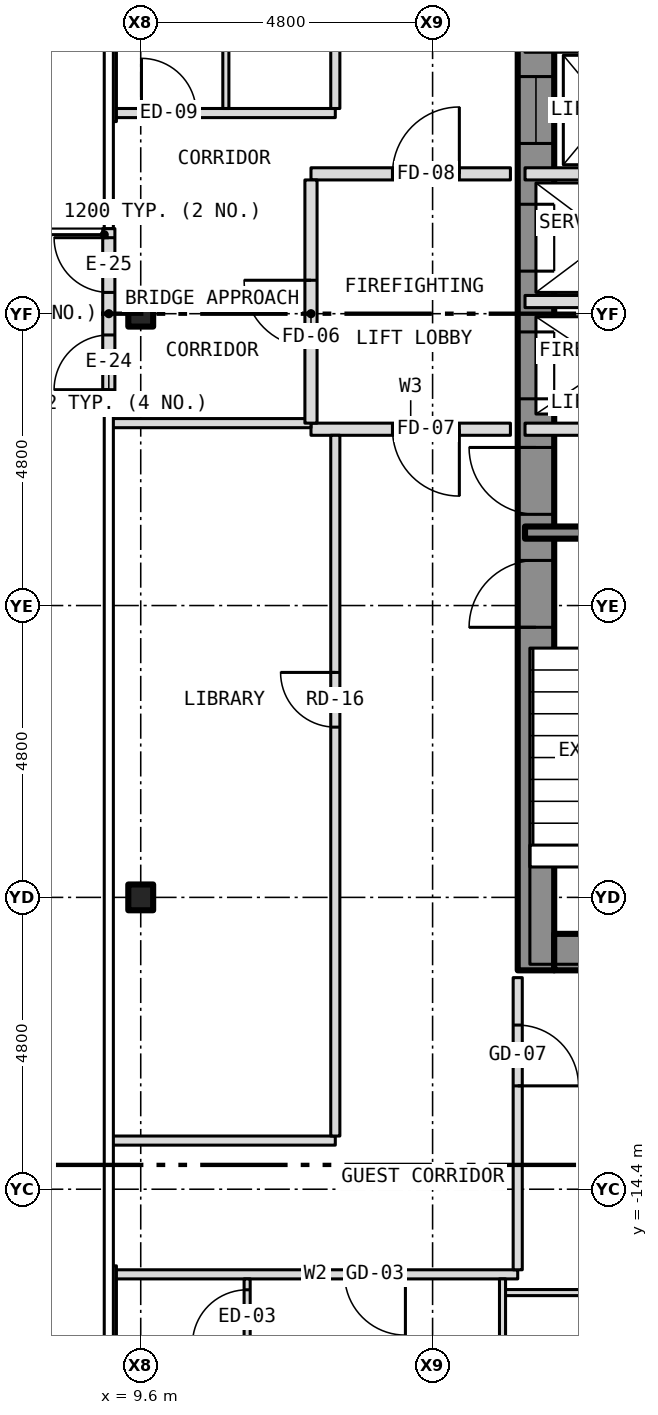
"""IFC4 building model, lengths in metres.
Left out: names, types, materials, properties, quantities, classifications, styles, units other than length and angle.
Written with IfcOpenShell. Run it as: python <this file> out.ifc"""

import sys

from ifc_helpers import new_model, si_unit, direction, frame, frame_2d, origin, origin_2d, place, context, subcontext, project, spatial, rectangle, i_section, extrude, element, fill, save


model = new_model("IFC4")
c1 = context("Model", 3, precision=1e-05, world=origin(), true_north=direction((0.0, 1.0)))
c2 = subcontext(c1, "Body", "Model", "MODEL_VIEW")
j1 = project(units=[si_unit("LENGTHUNIT", "METRE"), si_unit("PLANEANGLEUNIT", "RADIAN")], contexts=[c1])
p1 = place(None, origin())
s1 = spatial("IfcSite", under=j1, at=p1, CompositionType="ELEMENT")
p2 = place(p1, origin())
s2 = spatial("IfcBuilding", under=s1, at=p2, CompositionType="ELEMENT")
p3 = place(p2, frame((0.0, 0.0, 67.0)))
s3 = spatial("IfcBuildingStorey", under=s2, at=p3, CompositionType="ELEMENT", Elevation=67.0)
for number, where, z_axis, x_axis in (
    (1, (9.6, -9.6, -0.15), (0.0, 0.0, 1.0), (1.0, 0.0, 0.0)),
    (2, (9.6, 0.0, -0.15), (0.0, 0.0, 1.0), (1.0, 0.0, 0.0)),
):
    element("IfcColumn", number, at=place(p3, frame(where, z_axis=z_axis, x_axis=x_axis)), inside=s3, PredefinedType="COLUMN", context=c2, shape_type="SweptSolid", body=[
        extrude(i_section(OverallWidth=0.409, OverallDepth=0.424, WebThickness=0.033, FlangeThickness=0.052, at=origin_2d()), origin(), (0.0, 0.0, 1.0), 3.5),
    ])
p4 = place(p3, frame((16.1, -10.8, 0.0), z_axis=(0.0, 0.0, 1.0), x_axis=(0.0, 1.0, 0.0)))
e3 = element("IfcWall", 3, at=p4, inside=s3, PredefinedType="SHEAR", context=c2, shape_type="SweptSolid", body=[
    extrude(rectangle(XDim=21.6, YDim=0.6, at=frame_2d((10.8, 0.0))), origin(), (0.0, 0.0, 1.0), 3.25),
])
p5 = place(p4, frame((9.4, 0.0, 0.0)))
e4 = element("IfcOpeningElement", 4, at=p5, cuts=e3, PredefinedType="OPENING", context=c2, shape_type="SweptSolid", body=[
    extrude(rectangle(XDim=1.1, YDim=2.1, at=frame_2d((0.55, 1.05))), frame((0.0, 0.312, 0.0), z_axis=(0.0, -1.0, 0.0), x_axis=(1.0, 0.0, 0.0)), (0.0, 0.0, 1.0), 0.624),
])
p6 = place(p4, frame((11.5, 0.0, 0.0)))
e5 = element("IfcOpeningElement", 5, at=p6, cuts=e3, PredefinedType="OPENING", context=c2, shape_type="SweptSolid", body=[
    extrude(rectangle(XDim=1.1, YDim=2.1, at=frame_2d((0.55, 1.05))), frame((0.0, 0.312, 0.0), z_axis=(0.0, -1.0, 0.0), x_axis=(1.0, 0.0, 0.0)), (0.0, 0.0, 1.0), 0.624),
])
p7 = place(p4, frame((13.6, 0.0, 0.0)))
e6 = element("IfcOpeningElement", 6, at=p7, cuts=e3, PredefinedType="OPENING", context=c2, shape_type="SweptSolid", body=[
    extrude(rectangle(XDim=1.1, YDim=2.1, at=frame_2d((0.55, 1.05))), frame((0.0, 0.312, 0.0), z_axis=(0.0, -1.0, 0.0), x_axis=(1.0, 0.0, 0.0)), (0.0, 0.0, 1.0), 0.624),
])
p8 = place(p4, frame((15.7, 0.0, 0.0)))
e7 = element("IfcOpeningElement", 7, at=p8, cuts=e3, PredefinedType="OPENING", context=c2, shape_type="SweptSolid", body=[
    extrude(rectangle(XDim=1.1, YDim=2.1, at=frame_2d((0.55, 1.05))), frame((0.0, 0.312, 0.0), z_axis=(0.0, -1.0, 0.0), x_axis=(1.0, 0.0, 0.0)), (0.0, 0.0, 1.0), 0.624),
])
p9 = place(p4, frame((17.8, 0.0, 0.0)))
e8 = element("IfcOpeningElement", 8, at=p9, cuts=e3, PredefinedType="OPENING", context=c2, shape_type="SweptSolid", body=[
    extrude(rectangle(XDim=1.1, YDim=2.1, at=frame_2d((0.55, 1.05))), frame((0.0, 0.312, 0.0), z_axis=(0.0, -1.0, 0.0), x_axis=(1.0, 0.0, 0.0)), (0.0, 0.0, 1.0), 0.624),
])
p10 = place(p4, frame((5.642, 0.0, 0.0)))
e9 = element("IfcOpeningElement", 9, at=p10, cuts=e3, PredefinedType="OPENING", context=c2, shape_type="SweptSolid", body=[
    extrude(rectangle(XDim=1.1, YDim=2.1, at=frame_2d((0.55, 1.05))), frame((0.0, 0.312, 0.0), z_axis=(0.0, -1.0, 0.0), x_axis=(1.0, 0.0, 0.0)), (0.0, 0.0, 1.0), 0.624),
])
p11 = place(p4, frame((7.5, 0.0, 0.0)))
e10 = element("IfcOpeningElement", 10, at=p11, cuts=e3, PredefinedType="OPENING", context=c2, shape_type="SweptSolid", body=[
    extrude(rectangle(XDim=1.1, YDim=2.1, at=frame_2d((0.55, 1.05))), frame((0.0, 0.312, 0.0), z_axis=(0.0, -1.0, 0.0), x_axis=(1.0, 0.0, 0.0)), (0.0, 0.0, 1.0), 0.624),
])
p12 = place(p3, frame((16.4, -10.5, 0.0), z_axis=(0.0, 0.0, 1.0), x_axis=(1.0, 0.0, 0.0)))
e11 = element("IfcWall", 11, at=p12, inside=s3, PredefinedType="SHEAR", context=c2, shape_type="SweptSolid", body=[
    extrude(rectangle(XDim=7.0, YDim=0.6, at=frame_2d((3.5, 0.0))), origin(), (0.0, 0.0, 1.0), 3.25),
])
p13 = place(p3, frame((9.075, -1.4, 0.0), z_axis=(0.0, 0.0, 1.0), x_axis=(0.0, 1.0, 0.0)))
e12 = element("IfcWall", 12, at=p13, inside=s3, PredefinedType="SOLIDWALL", context=c2, shape_type="SweptSolid", body=[
    extrude(rectangle(XDim=2.8, YDim=0.2, at=frame_2d((1.4, 0.0))), origin(), (0.0, 0.0, 1.0), 3.5),
])
p14 = place(p13, frame((0.15, 0.0, 0.0)))
e13 = element("IfcOpeningElement", 13, at=p14, cuts=e12, PredefinedType="OPENING", context=c2, shape_type="SweptSolid", body=[
    extrude(rectangle(XDim=0.9, YDim=2.1, at=frame_2d((0.45, 1.05))), frame((0.0, 0.112, 0.0), z_axis=(0.0, -1.0, 0.0), x_axis=(1.0, 0.0, 0.0)), (0.0, 0.0, 1.0), 0.224),
])
p15 = place(p13, frame((1.75, 0.0, 0.0)))
e14 = element("IfcOpeningElement", 14, at=p15, cuts=e12, PredefinedType="OPENING", context=c2, shape_type="SweptSolid", body=[
    extrude(rectangle(XDim=0.9, YDim=2.1, at=frame_2d((0.45, 1.05))), frame((0.0, 0.112, 0.0), z_axis=(0.0, -1.0, 0.0), x_axis=(1.0, 0.0, 0.0)), (0.0, 0.0, 1.0), 0.224),
])
p16 = place(p3, frame((15.55, -16.1, 0.0), z_axis=(0.0, 0.0, 1.0), x_axis=(1.0, 0.0, 0.0)))
e15 = element("IfcWall", 15, at=p16, inside=s3, PredefinedType="PARTITIONING", context=c2, shape_type="SweptSolid", body=[
    extrude(rectangle(XDim=8.33, YDim=0.1, at=frame_2d((4.165, 0.0))), origin(), (0.0, 0.0, 1.0), 3.35),
])
p17 = place(p16, frame((3.778, 0.0, 0.0)))
e16 = element("IfcOpeningElement", 16, at=p17, cuts=e15, PredefinedType="OPENING", context=c2, shape_type="SweptSolid", body=[
    extrude(rectangle(XDim=0.9, YDim=2.1, at=frame_2d((0.45, 1.05))), frame((0.0, 0.062, 0.0), z_axis=(0.0, -1.0, 0.0), x_axis=(1.0, 0.0, 0.0)), (0.0, 0.0, 1.0), 0.124),
])
p18 = place(p3, frame((9.15, -15.8, 0.0), z_axis=(0.0, 0.0, 1.0), x_axis=(1.0, 0.0, 0.0)))
e17 = element("IfcWall", 17, at=p18, inside=s3, PredefinedType="PARTITIONING", context=c2, shape_type="SweptSolid", body=[
    extrude(rectangle(XDim=6.65, YDim=0.15, at=frame_2d((3.325, 0.0))), origin(), (0.0, 0.0, 1.0), 3.35),
])
p19 = place(p18, frame((3.803, 0.0, 0.0)))
e18 = element("IfcOpeningElement", 18, at=p19, cuts=e17, PredefinedType="OPENING", context=c2, shape_type="SweptSolid", body=[
    extrude(rectangle(XDim=1.0, YDim=2.1, at=frame_2d((0.5, 1.05))), frame((0.0, 0.087, 0.0), z_axis=(0.0, -1.0, 0.0), x_axis=(1.0, 0.0, 0.0)), (0.0, 0.0, 1.0), 0.174),
])
p20 = place(p3, frame((9.12, -13.6, 0.0), z_axis=(0.0, 0.0, 1.0), x_axis=(1.0, 0.0, 0.0)))
e19 = element("IfcWall", 19, at=p20, inside=s3, PredefinedType="PARTITIONING", context=c2, shape_type="SweptSolid", body=[
    extrude(rectangle(XDim=3.68, YDim=0.15, at=frame_2d((1.84, 0.0))), origin(), (0.0, 0.0, 1.0), 3.35),
])
p21 = place(p3, frame((15.92, -3.6, 0.0), z_axis=(0.0, 0.0, 1.0), x_axis=(1.0, 0.0, 0.0)))
e20 = element("IfcWall", 20, at=p21, inside=s3, PredefinedType="SHEAR", context=c2, shape_type="SweptSolid", body=[
    extrude(rectangle(XDim=4.08, YDim=0.2, at=frame_2d((2.04, 0.0))), origin(), (0.0, 0.0, 1.0), 3.25),
])
p22 = place(p3, frame((12.4, -1.9, 0.0), z_axis=(0.0, 0.0, 1.0), x_axis=(1.0, 0.0, 0.0)))
e21 = element("IfcWall", 21, at=p22, inside=s3, PredefinedType="PARTITIONING", context=c2, shape_type="SweptSolid", body=[
    extrude(rectangle(XDim=3.28, YDim=0.2, at=frame_2d((1.64, 0.0))), origin(), (0.0, 0.0, 1.0), 3.35),
])
p23 = place(p22, frame((1.34, 0.0, 0.0)))
e22 = element("IfcOpeningElement", 22, at=p23, cuts=e21, PredefinedType="OPENING", context=c2, shape_type="SweptSolid", body=[
    extrude(rectangle(XDim=1.1, YDim=2.1, at=frame_2d((0.55, 1.05))), frame((0.0, 0.112, 0.0), z_axis=(0.0, -1.0, 0.0), x_axis=(1.0, 0.0, 0.0)), (0.0, 0.0, 1.0), 0.224),
])
p24 = place(p3, frame((15.92, -1.9, 0.0), z_axis=(0.0, 0.0, 1.0), x_axis=(1.0, 0.0, 0.0)))
e23 = element("IfcWall", 23, at=p24, inside=s3, PredefinedType="PARTITIONING", context=c2, shape_type="SweptSolid", body=[
    extrude(rectangle(XDim=7.96, YDim=0.2, at=frame_2d((3.98, 0.0))), origin(), (0.0, 0.0, 1.0), 3.25),
])
p25 = place(p24, frame((3.74, 0.0, 0.0)))
e24 = element("IfcOpeningElement", 24, at=p25, cuts=e23, PredefinedType="OPENING", context=c2, shape_type="SweptSolid", body=[
    extrude(rectangle(XDim=0.9, YDim=2.1, at=frame_2d((0.45, 1.05))), frame((0.0, 0.112, 0.0), z_axis=(0.0, -1.0, 0.0), x_axis=(1.0, 0.0, 0.0)), (0.0, 0.0, 1.0), 0.224),
])
p26 = place(p3, frame((9.12, -1.8, 0.0), z_axis=(0.0, 0.0, 1.0), x_axis=(1.0, 0.0, 0.0)))
e25 = element("IfcWall", 25, at=p26, inside=s3, PredefinedType="PARTITIONING", context=c2, shape_type="SweptSolid", body=[
    extrude(rectangle(XDim=3.28, YDim=0.15, at=frame_2d((1.64, 0.0))), origin(), (0.0, 0.0, 1.0), 3.35),
])
p27 = place(p3, frame((15.92, 0.2, 0.0), z_axis=(0.0, 0.0, 1.0), x_axis=(1.0, 0.0, 0.0)))
e26 = element("IfcWall", 26, at=p27, inside=s3, PredefinedType="PARTITIONING", context=c2, shape_type="SweptSolid", body=[
    extrude(rectangle(XDim=2.88, YDim=0.2, at=frame_2d((1.44, 0.0))), origin(), (0.0, 0.0, 1.0), 3.25),
])
p28 = place(p3, frame((12.4, 2.3, 0.0), z_axis=(0.0, 0.0, 1.0), x_axis=(1.0, 0.0, 0.0)))
e27 = element("IfcWall", 27, at=p28, inside=s3, PredefinedType="PARTITIONING", context=c2, shape_type="SweptSolid", body=[
    extrude(rectangle(XDim=3.28, YDim=0.2, at=frame_2d((1.64, 0.0))), origin(), (0.0, 0.0, 1.0), 3.35),
])
p29 = place(p28, frame((1.34, 0.0, 0.0)))
e28 = element("IfcOpeningElement", 28, at=p29, cuts=e27, PredefinedType="OPENING", context=c2, shape_type="SweptSolid", body=[
    extrude(rectangle(XDim=1.1, YDim=2.1, at=frame_2d((0.55, 1.05))), frame((0.0, 0.112, 0.0), z_axis=(0.0, -1.0, 0.0), x_axis=(1.0, 0.0, 0.0)), (0.0, 0.0, 1.0), 0.224),
])
p30 = place(p3, frame((15.92, 2.3, 0.0), z_axis=(0.0, 0.0, 1.0), x_axis=(1.0, 0.0, 0.0)))
e29 = element("IfcWall", 29, at=p30, inside=s3, PredefinedType="PARTITIONING", context=c2, shape_type="SweptSolid", body=[
    extrude(rectangle(XDim=2.88, YDim=0.2, at=frame_2d((1.44, 0.0))), origin(), (0.0, 0.0, 1.0), 3.25),
])
p31 = place(p3, frame((9.15, 3.3, 0.0), z_axis=(0.0, 0.0, 1.0), x_axis=(1.0, 0.0, 0.0)))
e30 = element("IfcWall", 30, at=p31, inside=s3, PredefinedType="PARTITIONING", context=c2, shape_type="SweptSolid", body=[
    extrude(rectangle(XDim=3.65, YDim=0.15, at=frame_2d((1.825, 0.0))), origin(), (0.0, 0.0, 1.0), 3.35),
])
p32 = place(p31, frame((0.462, 0.0, 0.0)))
e31 = element("IfcOpeningElement", 31, at=p32, cuts=e30, PredefinedType="OPENING", context=c2, shape_type="SweptSolid", body=[
    extrude(rectangle(XDim=0.9, YDim=2.1, at=frame_2d((0.45, 1.05))), frame((0.0, 0.087, 0.0), z_axis=(0.0, -1.0, 0.0), x_axis=(1.0, 0.0, 0.0)), (0.0, 0.0, 1.0), 0.174),
])
p33 = place(p3, frame((15.92, 4.4, 0.0), z_axis=(0.0, 0.0, 1.0), x_axis=(1.0, 0.0, 0.0)))
e32 = element("IfcWall", 32, at=p33, inside=s3, PredefinedType="PARTITIONING", context=c2, shape_type="SweptSolid", body=[
    extrude(rectangle(XDim=2.88, YDim=0.2, at=frame_2d((1.44, 0.0))), origin(), (0.0, 0.0, 1.0), 3.25),
])
p34 = place(p3, frame((9.15, -19.14, 0.0), z_axis=(0.0, 0.0, 1.0), x_axis=(0.0, 1.0, 0.0)))
e33 = element("IfcWall", 33, at=p34, inside=s3, PredefinedType="PARTITIONING", context=c2, shape_type="SweptSolid", body=[
    extrude(rectangle(XDim=3.48, YDim=0.1, at=frame_2d((1.74, 0.0))), origin(), (0.0, 0.0, 1.0), 2.733),
])
p35 = place(p3, frame((9.15, 3.16, 0.0), z_axis=(0.0, 0.0, 1.0), x_axis=(0.0, 1.0, 0.0)))
e34 = element("IfcWall", 34, at=p35, inside=s3, PredefinedType="PARTITIONING", context=c2, shape_type="SweptSolid", body=[
    extrude(rectangle(XDim=10.58, YDim=0.1, at=frame_2d((5.29, 0.0))), origin(), (0.0, 0.0, 1.0), 2.733),
])
p36 = place(p3, frame((11.0, 3.375, 0.0), z_axis=(0.0, 0.0, 1.0), x_axis=(0.0, 1.0, 0.0)))
e35 = element("IfcWall", 35, at=p36, inside=s3, PredefinedType="PARTITIONING", context=c2, shape_type="SweptSolid", body=[
    extrude(rectangle(XDim=10.15, YDim=0.1, at=frame_2d((5.075, 0.0))), origin(), (0.0, 0.0, 1.0), 3.35),
])
p37 = place(p3, frame((11.35, -18.95, 0.0), z_axis=(0.0, 0.0, 1.0), x_axis=(0.0, 1.0, 0.0)))
e36 = element("IfcWall", 36, at=p37, inside=s3, PredefinedType="PARTITIONING", context=c2, shape_type="SweptSolid", body=[
    extrude(rectangle(XDim=3.075, YDim=0.1, at=frame_2d((1.538, 0.0))), origin(), (0.0, 0.0, 1.0), 3.35),
])
p38 = place(p37, frame((1.996, 0.0, 0.0)))
e37 = element("IfcOpeningElement", 37, at=p38, cuts=e36, PredefinedType="OPENING", context=c2, shape_type="SweptSolid", body=[
    extrude(rectangle(XDim=0.9, YDim=2.1, at=frame_2d((0.45, 1.05))), frame((0.0, 0.062, 0.0), z_axis=(0.0, -1.0, 0.0), x_axis=(1.0, 0.0, 0.0)), (0.0, 0.0, 1.0), 0.124),
])
p39 = place(p3, frame((12.4, -1.8, 0.0), z_axis=(0.0, 0.0, 1.0), x_axis=(0.0, 1.0, 0.0)))
e38 = element("IfcWall", 38, at=p39, inside=s3, PredefinedType="PARTITIONING", context=c2, shape_type="SweptSolid", body=[
    extrude(rectangle(XDim=4.0, YDim=0.2, at=frame_2d((2.0, 0.0))), origin(), (0.0, 0.0, 1.0), 3.35),
])
p40 = place(p39, frame((1.25, 0.0, 0.0)))
e39 = element("IfcOpeningElement", 39, at=p40, cuts=e38, PredefinedType="OPENING", context=c2, shape_type="SweptSolid", body=[
    extrude(rectangle(XDim=1.1, YDim=2.1, at=frame_2d((0.55, 1.05))), frame((0.0, 0.112, 0.0), z_axis=(0.0, -1.0, 0.0), x_axis=(1.0, 0.0, 0.0)), (0.0, 0.0, 1.0), 0.224),
])
p41 = place(p3, frame((12.8, -13.525, 0.0), z_axis=(0.0, 0.0, 1.0), x_axis=(0.0, 1.0, 0.0)))
e40 = element("IfcWall", 40, at=p41, inside=s3, PredefinedType="PARTITIONING", context=c2, shape_type="SweptSolid", body=[
    extrude(rectangle(XDim=11.525, YDim=0.15, at=frame_2d((5.762, 0.0))), origin(), (0.0, 0.0, 1.0), 3.35),
])
p42 = place(p41, frame((6.725, 0.0, 0.0)))
e41 = element("IfcOpeningElement", 41, at=p42, cuts=e40, PredefinedType="OPENING", context=c2, shape_type="SweptSolid", body=[
    extrude(rectangle(XDim=0.9, YDim=2.1, at=frame_2d((0.45, 1.05))), frame((0.0, 0.087, 0.0), z_axis=(0.0, -1.0, 0.0), x_axis=(1.0, 0.0, 0.0)), (0.0, 0.0, 1.0), 0.174),
])
p43 = place(p3, frame((12.8, 3.375, 0.0), z_axis=(0.0, 0.0, 1.0), x_axis=(0.0, 1.0, 0.0)))
e42 = element("IfcWall", 42, at=p43, inside=s3, PredefinedType="PARTITIONING", context=c2, shape_type="SweptSolid", body=[
    extrude(rectangle(XDim=7.275, YDim=0.15, at=frame_2d((3.637, 0.0))), origin(), (0.0, 0.0, 1.0), 3.35),
])
p44 = place(p43, frame((3.175, 0.0, 0.0)))
e43 = element("IfcOpeningElement", 43, at=p44, cuts=e42, PredefinedType="OPENING", context=c2, shape_type="SweptSolid", body=[
    extrude(rectangle(XDim=0.9, YDim=2.1, at=frame_2d((0.45, 1.05))), frame((0.0, 0.087, 0.0), z_axis=(0.0, -1.0, 0.0), x_axis=(1.0, 0.0, 0.0)), (0.0, 0.0, 1.0), 0.174),
])
p45 = place(p3, frame((15.55, -23.88, 0.0), z_axis=(0.0, 0.0, 1.0), x_axis=(0.0, 1.0, 0.0)))
e44 = element("IfcWall", 44, at=p45, inside=s3, PredefinedType="PARTITIONING", context=c2, shape_type="SweptSolid", body=[
    extrude(rectangle(XDim=8.005, YDim=0.1, at=frame_2d((4.002, 0.0))), origin(), (0.0, 0.0, 1.0), 3.35),
])
p46 = place(p3, frame((15.8, -15.725, 0.0), z_axis=(0.0, 0.0, 1.0), x_axis=(0.0, 1.0, 0.0)))
e45 = element("IfcWall", 45, at=p46, inside=s3, PredefinedType="PARTITIONING", context=c2, shape_type="SweptSolid", body=[
    extrude(rectangle(XDim=4.805, YDim=0.15, at=frame_2d((2.403, 0.0))), origin(), (0.0, 0.0, 1.0), 3.35),
])
p47 = place(p46, frame((3.025, 0.0, 0.0)))
e46 = element("IfcOpeningElement", 46, at=p47, cuts=e45, PredefinedType="OPENING", context=c2, shape_type="SweptSolid", body=[
    extrude(rectangle(XDim=1.0, YDim=2.1, at=frame_2d((0.5, 1.05))), frame((0.0, 0.087, 0.0), z_axis=(0.0, -1.0, 0.0), x_axis=(1.0, 0.0, 0.0)), (0.0, 0.0, 1.0), 0.174),
])
p48 = place(p14, origin())
e47 = element("IfcDoor", 47, at=p48, inside=s3, OperationType="SINGLE_SWING_LEFT", PredefinedType="DOOR", context=c2, shape_type="SweptSolid", body=[
    extrude(rectangle(XDim=0.9, YDim=2.1, at=frame_2d((0.45, 1.05))), frame((0.0, 0.025, 0.0), z_axis=(0.0, -1.0, 0.0), x_axis=(1.0, 0.0, 0.0)), (0.0, 0.0, 1.0), 0.05),
])
fill(e13, e47)
p49 = place(p15, origin())
e48 = element("IfcDoor", 48, at=p49, inside=s3, OperationType="SINGLE_SWING_RIGHT", PredefinedType="DOOR", context=c2, shape_type="SweptSolid", body=[
    extrude(rectangle(XDim=0.9, YDim=2.1, at=frame_2d((0.45, 1.05))), frame((0.0, 0.025, 0.0), z_axis=(0.0, -1.0, 0.0), x_axis=(1.0, 0.0, 0.0)), (0.0, 0.0, 1.0), 0.05),
])
fill(e14, e48)
p50 = place(p5, origin())
e49 = element("IfcDoor", 49, at=p50, inside=s3, OperationType="SLIDING_TO_LEFT", PredefinedType="DOOR", context=c2, shape_type="SweptSolid", body=[
    extrude(rectangle(XDim=1.1, YDim=2.1, at=frame_2d((0.55, 1.05))), frame((0.0, 0.025, 0.0), z_axis=(0.0, -1.0, 0.0), x_axis=(1.0, 0.0, 0.0)), (0.0, 0.0, 1.0), 0.05),
])
fill(e4, e49)
p51 = place(p6, origin())
e50 = element("IfcDoor", 50, at=p51, inside=s3, OperationType="SLIDING_TO_LEFT", PredefinedType="DOOR", context=c2, shape_type="SweptSolid", body=[
    extrude(rectangle(XDim=1.1, YDim=2.1, at=frame_2d((0.55, 1.05))), frame((0.0, 0.025, 0.0), z_axis=(0.0, -1.0, 0.0), x_axis=(1.0, 0.0, 0.0)), (0.0, 0.0, 1.0), 0.05),
])
fill(e5, e50)
p52 = place(p7, origin())
e51 = element("IfcDoor", 51, at=p52, inside=s3, OperationType="SLIDING_TO_LEFT", PredefinedType="DOOR", context=c2, shape_type="SweptSolid", body=[
    extrude(rectangle(XDim=1.1, YDim=2.1, at=frame_2d((0.55, 1.05))), frame((0.0, 0.025, 0.0), z_axis=(0.0, -1.0, 0.0), x_axis=(1.0, 0.0, 0.0)), (0.0, 0.0, 1.0), 0.05),
])
fill(e6, e51)
p53 = place(p10, origin())
e52 = element("IfcDoor", 52, at=p53, inside=s3, OperationType="SINGLE_SWING_LEFT", PredefinedType="DOOR", context=c2, shape_type="SweptSolid", body=[
    extrude(rectangle(XDim=1.1, YDim=2.1, at=frame_2d((0.55, 1.05))), frame((0.0, 0.025, 0.0), z_axis=(0.0, -1.0, 0.0), x_axis=(1.0, 0.0, 0.0)), (0.0, 0.0, 1.0), 0.05),
])
fill(e9, e52)
p54 = place(p11, origin())
e53 = element("IfcDoor", 53, at=p54, inside=s3, OperationType="SINGLE_SWING_RIGHT", PredefinedType="DOOR", context=c2, shape_type="SweptSolid", body=[
    extrude(rectangle(XDim=1.1, YDim=2.1, at=frame_2d((0.55, 1.05))), frame((0.0, 0.025, 0.0), z_axis=(0.0, -1.0, 0.0), x_axis=(1.0, 0.0, 0.0)), (0.0, 0.0, 1.0), 0.05),
])
fill(e10, e53)
p55 = place(p40, origin())
e54 = element("IfcDoor", 54, at=p55, inside=s3, OperationType="SINGLE_SWING_RIGHT", PredefinedType="DOOR", context=c2, shape_type="SweptSolid", body=[
    extrude(rectangle(XDim=1.1, YDim=2.1, at=frame_2d((0.55, 1.05))), frame((0.0, 0.025, 0.0), z_axis=(0.0, -1.0, 0.0), x_axis=(1.0, 0.0, 0.0)), (0.0, 0.0, 1.0), 0.05),
])
fill(e39, e54)
p56 = place(p23, origin())
e55 = element("IfcDoor", 55, at=p56, inside=s3, OperationType="SINGLE_SWING_RIGHT", PredefinedType="DOOR", context=c2, shape_type="SweptSolid", body=[
    extrude(rectangle(XDim=1.1, YDim=2.1, at=frame_2d((0.55, 1.05))), frame((0.0, 0.025, 0.0), z_axis=(0.0, -1.0, 0.0), x_axis=(1.0, 0.0, 0.0)), (0.0, 0.0, 1.0), 0.05),
])
fill(e22, e55)
p57 = place(p29, origin())
e56 = element("IfcDoor", 56, at=p57, inside=s3, OperationType="SINGLE_SWING_RIGHT", PredefinedType="DOOR", context=c2, shape_type="SweptSolid", body=[
    extrude(rectangle(XDim=1.1, YDim=2.1, at=frame_2d((0.55, 1.05))), frame((0.0, 0.025, 0.0), z_axis=(0.0, -1.0, 0.0), x_axis=(1.0, 0.0, 0.0)), (0.0, 0.0, 1.0), 0.05),
])
fill(e28, e56)
p58 = place(p19, origin())
e57 = element("IfcDoor", 57, at=p58, inside=s3, OperationType="SINGLE_SWING_RIGHT", PredefinedType="DOOR", context=c2, shape_type="SweptSolid", body=[
    extrude(rectangle(XDim=1.0, YDim=2.1, at=frame_2d((0.5, 1.05))), frame((0.0, 0.025, 0.0), z_axis=(0.0, -1.0, 0.0), x_axis=(1.0, 0.0, 0.0)), (0.0, 0.0, 1.0), 0.05),
])
fill(e18, e57)
p59 = place(p38, origin())
e58 = element("IfcDoor", 58, at=p59, inside=s3, OperationType="SINGLE_SWING_LEFT", PredefinedType="DOOR", context=c2, shape_type="SweptSolid", body=[
    extrude(rectangle(XDim=0.9, YDim=2.1, at=frame_2d((0.45, 1.05))), frame((0.0, 0.025, 0.0), z_axis=(0.0, -1.0, 0.0), x_axis=(1.0, 0.0, 0.0)), (0.0, 0.0, 1.0), 0.05),
])
fill(e37, e58)
p60 = place(p47, origin())
e59 = element("IfcDoor", 59, at=p60, inside=s3, OperationType="SINGLE_SWING_LEFT", PredefinedType="DOOR", context=c2, shape_type="SweptSolid", body=[
    extrude(rectangle(XDim=1.0, YDim=2.1, at=frame_2d((0.5, 1.05))), frame((0.0, 0.025, 0.0), z_axis=(0.0, -1.0, 0.0), x_axis=(1.0, 0.0, 0.0)), (0.0, 0.0, 1.0), 0.05),
])
fill(e46, e59)
p61 = place(p32, origin())
e60 = element("IfcDoor", 60, at=p61, inside=s3, OperationType="SINGLE_SWING_LEFT", PredefinedType="DOOR", context=c2, shape_type="SweptSolid", body=[
    extrude(rectangle(XDim=0.9, YDim=2.1, at=frame_2d((0.45, 1.05))), frame((0.0, 0.025, 0.0), z_axis=(0.0, -1.0, 0.0), x_axis=(1.0, 0.0, 0.0)), (0.0, 0.0, 1.0), 0.05),
])
fill(e31, e60)
p62 = place(p42, origin())
e61 = element("IfcDoor", 61, at=p62, inside=s3, OperationType="SINGLE_SWING_RIGHT", PredefinedType="DOOR", context=c2, shape_type="SweptSolid", body=[
    extrude(rectangle(XDim=0.9, YDim=2.1, at=frame_2d((0.45, 1.05))), frame((0.0, 0.025, 0.0), z_axis=(0.0, -1.0, 0.0), x_axis=(1.0, 0.0, 0.0)), (0.0, 0.0, 1.0), 0.05),
])
fill(e41, e61)
save(model, sys.argv[1])
